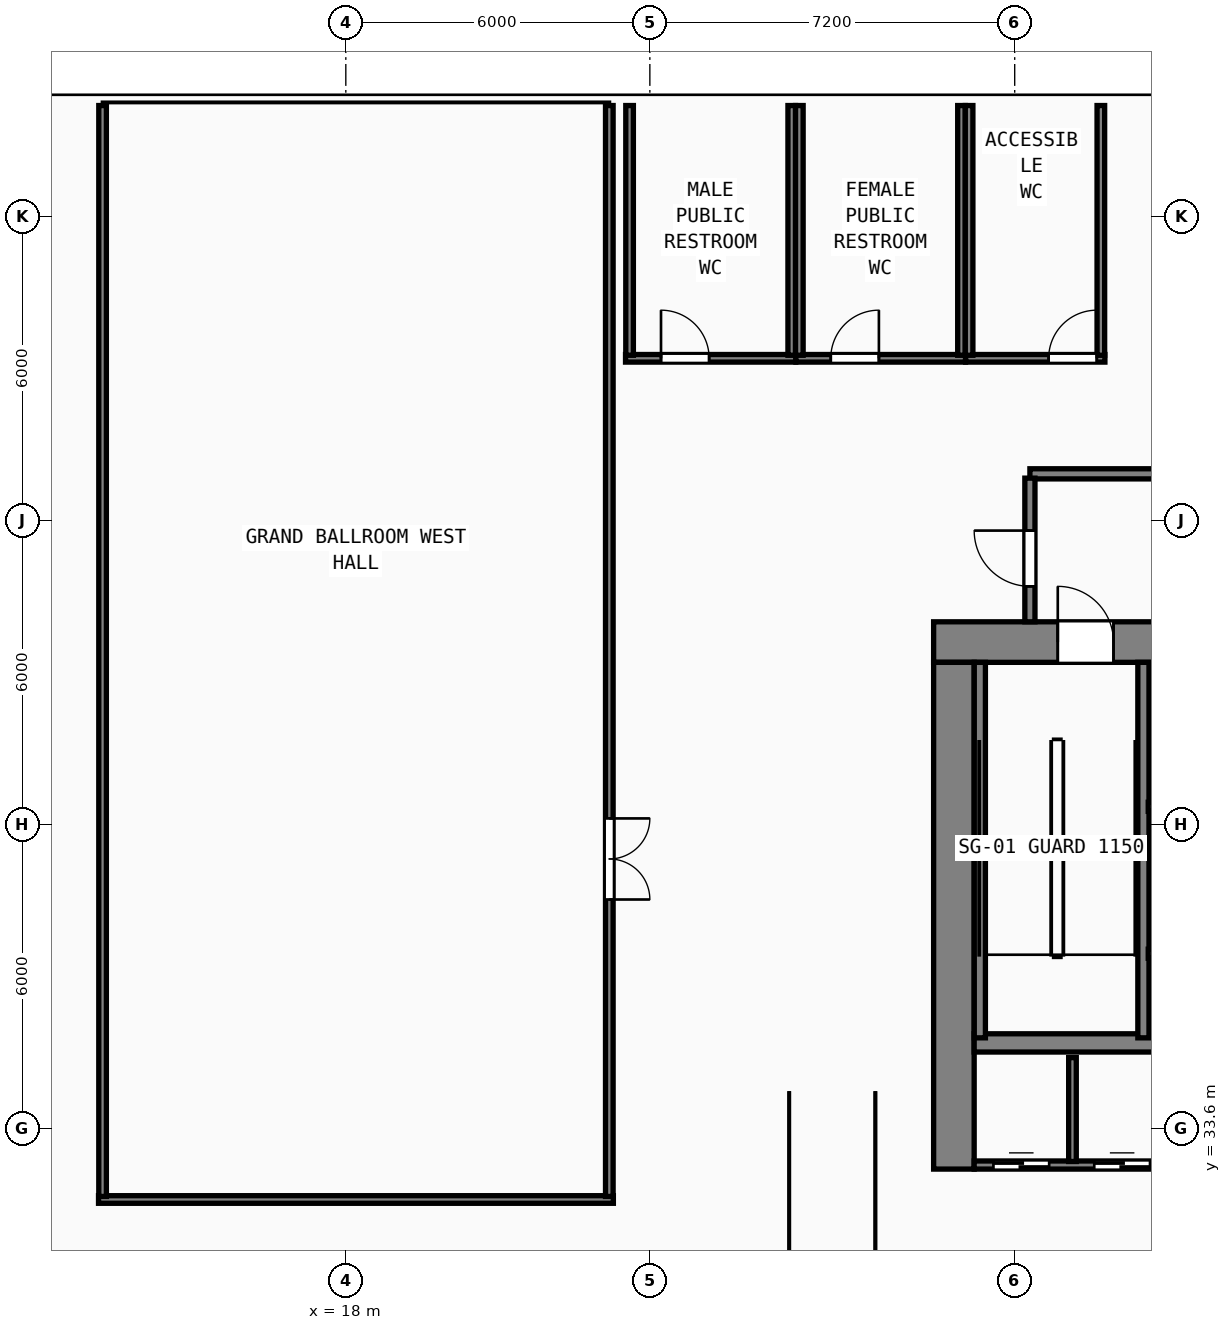
"""IFC4 building model, lengths in metres.
Left out: names, types, materials, properties, quantities, classifications, styles, units other than length and angle.
Written with IfcOpenShell. Run it as: python <this file> out.ifc"""

import sys

from ifc_helpers import new_model, si_unit, direction, frame, frame_2d, origin, origin_2d, place, context, subcontext, project, spatial, rectangle, hollow_rectangle, extrude, element, fill, save


model = new_model("IFC4")
c1 = context("Model", 3, precision=1e-05, world=origin(), true_north=direction((0.0, 1.0)))
c2 = subcontext(c1, "Body", "Model", "MODEL_VIEW")
j1 = project(units=[si_unit("LENGTHUNIT", "METRE"), si_unit("PLANEANGLEUNIT", "RADIAN")], contexts=[c1])
p1 = place(None, origin())
s1 = spatial("IfcSite", under=j1, at=p1, CompositionType="ELEMENT")
p2 = place(p1, origin())
s2 = spatial("IfcBuilding", under=s1, at=p2, CompositionType="ELEMENT")
p3 = place(p2, frame((0.0, 0.0, 10.2)))
s3 = spatial("IfcBuildingStorey", under=s2, at=p3, CompositionType="ELEMENT", Elevation=10.2)
p4 = place(p3, frame((29.6, 43.2, 0.0), z_axis=(0.0, 0.0, 1.0), x_axis=(1.0, 0.0, 0.0)))
e1 = element("IfcWall", 1, at=p4, inside=s3, PredefinedType="SHEAR", context=c2, shape_type="SweptSolid", body=[
    extrude(rectangle(XDim=17.6, YDim=0.8, at=frame_2d((8.8, 0.0))), origin(), (0.0, 0.0, 1.0), 5.16),
])
p5 = place(p4, frame((2.45, 0.0, 0.0)))
e2 = element("IfcOpeningElement", 2, at=p5, cuts=e1, PredefinedType="OPENING", context=c2, shape_type="SweptSolid", body=[
    extrude(rectangle(XDim=1.1, YDim=2.15, at=frame_2d((0.55, 1.075))), frame((0.0, 0.41, 0.0), z_axis=(0.0, -1.0, 0.0), x_axis=(1.0, 0.0, 0.0)), (0.0, 0.0, 1.0), 0.82),
])
p6 = place(p4, frame((7.56, 0.0, 0.0)))
e3 = element("IfcOpeningElement", 3, at=p6, cuts=e1, PredefinedType="OPENING", context=c2, shape_type="SweptSolid", body=[
    extrude(rectangle(XDim=1.1, YDim=2.15, at=frame_2d((0.55, 1.075))), frame((0.0, 0.41, 0.0), z_axis=(0.0, -1.0, 0.0), x_axis=(1.0, 0.0, 0.0)), (0.0, 0.0, 1.0), 0.82),
])
p7 = place(p4, frame((13.65, 0.0, 0.0)))
e4 = element("IfcOpeningElement", 4, at=p7, cuts=e1, PredefinedType="OPENING", context=c2, shape_type="SweptSolid", body=[
    extrude(rectangle(XDim=1.1, YDim=2.15, at=frame_2d((0.55, 1.075))), frame((0.0, 0.41, 0.0), z_axis=(0.0, -1.0, 0.0), x_axis=(1.0, 0.0, 0.0)), (0.0, 0.0, 1.0), 0.82),
])
p8 = place(p4, frame((4.78, 0.0, 0.0)))
e5 = element("IfcOpeningElement", 5, at=p8, cuts=e1, PredefinedType="OPENING", context=c2, shape_type="SweptSolid", body=[
    extrude(rectangle(XDim=1.1, YDim=2.2, at=frame_2d((0.55, 1.1))), frame((0.0, 0.41, 0.0), z_axis=(0.0, -1.0, 0.0), x_axis=(1.0, 0.0, 0.0)), (0.0, 0.0, 1.0), 0.82),
])
p9 = place(p4, frame((11.14, 0.0, 0.0)))
e6 = element("IfcOpeningElement", 6, at=p9, cuts=e1, PredefinedType="OPENING", context=c2, shape_type="SweptSolid", body=[
    extrude(rectangle(XDim=1.1, YDim=2.2, at=frame_2d((0.55, 1.1))), frame((0.0, 0.41, 0.0), z_axis=(0.0, -1.0, 0.0), x_axis=(1.0, 0.0, 0.0)), (0.0, 0.0, 1.0), 0.82),
])
p10 = place(p3, frame((30.0, 32.8, 0.0), z_axis=(0.0, 0.0, 1.0), x_axis=(0.0, 1.0, 0.0)))
e7 = element("IfcWall", 7, at=p10, inside=s3, PredefinedType="SHEAR", context=c2, shape_type="SweptSolid", body=[
    extrude(rectangle(XDim=10.0, YDim=0.8, at=frame_2d((5.0, 0.0))), origin(), (0.0, 0.0, 1.0), 5.16),
])
p11 = place(p3, frame((30.4, 35.29, 0.0), z_axis=(0.0, 0.0, 1.0), x_axis=(1.0, 0.0, 0.0)))
e8 = element("IfcWall", 8, at=p11, inside=s3, PredefinedType="SHEAR", context=c2, shape_type="SweptSolid", body=[
    extrude(rectangle(XDim=16.0, YDim=0.36, at=frame_2d((8.0, 0.0))), origin(), (0.0, 0.0, 1.0), 5.16),
])
p12 = place(p11, frame((4.95, 0.0, 0.0), z_axis=(0.0, 0.0, 1.0), x_axis=(-1.0, 0.0, 0.0)))
e9 = element("IfcOpeningElement", 9, at=p12, cuts=e8, PredefinedType="OPENING", context=c2, shape_type="SweptSolid", body=[
    extrude(rectangle(XDim=0.9, YDim=2.1, at=frame_2d((0.45, 1.05))), frame((0.0, 0.19, 0.0), z_axis=(0.0, -1.0, 0.0), x_axis=(1.0, 0.0, 0.0)), (0.0, 0.0, 1.0), 0.38),
])
p13 = place(p11, frame((12.01, 0.0, 0.0), z_axis=(0.0, 0.0, 1.0), x_axis=(-1.0, 0.0, 0.0)))
e10 = element("IfcOpeningElement", 10, at=p13, cuts=e8, PredefinedType="OPENING", context=c2, shape_type="SweptSolid", body=[
    extrude(rectangle(XDim=0.9, YDim=2.1, at=frame_2d((0.45, 1.05))), frame((0.0, 0.19, 0.0), z_axis=(0.0, -1.0, 0.0), x_axis=(1.0, 0.0, 0.0)), (0.0, 0.0, 1.0), 0.38),
])
for number, where, z_axis, x_axis in (
    (11, (30.512, 35.39, 0.0), (0.0, 0.0, 1.0), (0.0, 1.0, 0.0)),
    (12, (33.74, 35.39, 0.0), (0.0, 0.0, 1.0), (0.0, 1.0, 0.0)),
):
    element("IfcWall", number, at=place(p3, frame(where, z_axis=z_axis, x_axis=x_axis)), inside=s3, PredefinedType="SHEAR", context=c2, shape_type="SweptSolid", body=[
        extrude(rectangle(XDim=7.41, YDim=0.22, at=frame_2d((3.705, 0.0))), origin(), (0.0, 0.0, 1.0), 5.16),
    ])
for number, where, z_axis, x_axis in (
    (13, (24.0, 33.6, 0.0), (0.0, 0.0, 1.0), (1.0, 0.0, 0.0)),
    (14, (24.0, 45.6, 0.0), (0.0, 0.0, 1.0), (1.0, 0.0, 0.0)),
    (15, (31.2, 50.4, 0.0), (0.0, 0.0, 1.0), (1.0, 0.0, 0.0)),
    (16, (12.6, 38.4, 0.0), (0.0, 0.0, 1.0), (1.0, 0.0, 0.0)),
):
    element("IfcColumn", number, at=place(p3, frame(where, z_axis=z_axis, x_axis=x_axis)), inside=s3, PredefinedType="COLUMN", context=c2, shape_type="SweptSolid", body=[
        extrude(hollow_rectangle(XDim=1.3, YDim=1.3, WallThickness=0.048, at=origin_2d()), origin(), (0.0, 0.0, 1.0), 5.4),
    ])
p14 = place(p3, frame((18.0, 51.6, 0.0), z_axis=(0.0, 0.0, 1.0), x_axis=(1.0, 0.0, 0.0)))
e17 = element("IfcColumn", 17, at=p14, inside=s3, PredefinedType="COLUMN", context=c2, shape_type="SweptSolid", body=[
    extrude(rectangle(XDim=0.9, YDim=0.9, at=origin_2d()), origin(), (0.0, 0.0, 1.0), 5.4),
])
p15 = place(p3, frame((31.5, 46.52, 0.0), z_axis=(0.0, 0.0, 1.0), x_axis=(1.0, 0.0, 0.0)))
e18 = element("IfcWall", 18, at=p15, inside=s3, PredefinedType="SOLIDWALL", context=c2, shape_type="SweptSolid", body=[
    extrude(rectangle(XDim=13.8, YDim=0.2, at=frame_2d((6.9, 0.0))), origin(), (0.0, 0.0, 1.0), 5.16),
])
p16 = place(p3, frame((31.5, 43.6, 0.0), z_axis=(0.0, 0.0, 1.0), x_axis=(0.0, 1.0, 0.0)))
e19 = element("IfcWall", 19, at=p16, inside=s3, PredefinedType="SOLIDWALL", context=c2, shape_type="SweptSolid", body=[
    extrude(rectangle(XDim=2.835, YDim=0.2, at=frame_2d((1.417, 0.0))), origin(), (0.0, 0.0, 1.0), 5.16),
])
p17 = place(p16, frame((1.8, 0.0, 0.0), z_axis=(0.0, 0.0, 1.0), x_axis=(-1.0, 0.0, 0.0)))
e20 = element("IfcOpeningElement", 20, at=p17, cuts=e19, PredefinedType="OPENING", context=c2, shape_type="SweptSolid", body=[
    extrude(rectangle(XDim=1.1, YDim=2.15, at=frame_2d((0.55, 1.075))), frame((0.0, 0.11, 0.0), z_axis=(0.0, -1.0, 0.0), x_axis=(1.0, 0.0, 0.0)), (0.0, 0.0, 1.0), 0.22),
])
p18 = place(p3, frame((33.835, 39.95, 0.0), z_axis=(0.0, 0.0, 1.0), x_axis=(1.0, 0.0, 0.0)))
e21 = element("IfcWall", 21, at=p18, inside=s3, PredefinedType="SOLIDWALL", context=c2, shape_type="SweptSolid", body=[
    extrude(rectangle(XDim=2.77, YDim=0.18, at=frame_2d((1.385, 0.0))), origin(), (0.0, 0.0, 1.0), 5.16),
])
p19 = place(p3, frame((33.835, 37.05, 0.0), z_axis=(0.0, 0.0, 1.0), x_axis=(1.0, 0.0, 0.0)))
e22 = element("IfcWall", 22, at=p19, inside=s3, PredefinedType="SOLIDWALL", context=c2, shape_type="SweptSolid", body=[
    extrude(rectangle(XDim=2.77, YDim=0.18, at=frame_2d((1.385, 0.0))), origin(), (0.0, 0.0, 1.0), 5.16),
])
p20 = place(p19, frame((1.945, 0.0, 0.0), z_axis=(0.0, 0.0, 1.0), x_axis=(-1.0, 0.0, 0.0)))
e23 = element("IfcOpeningElement", 23, at=p20, cuts=e22, PredefinedType="OPENING", context=c2, shape_type="SweptSolid", body=[
    extrude(rectangle(XDim=1.2, YDim=2.2, at=frame_2d((0.6, 1.1))), frame((0.0, 0.1, 0.0), z_axis=(0.0, -1.0, 0.0), x_axis=(1.0, 0.0, 0.0)), (0.0, 0.0, 1.0), 0.2),
])
p21 = place(p3, frame((30.4, 32.88, 0.0), z_axis=(0.0, 0.0, 1.0), x_axis=(1.0, 0.0, 0.0)))
e24 = element("IfcWall", 24, at=p21, inside=s3, PredefinedType="SOLIDWALL", context=c2, shape_type="SweptSolid", body=[
    extrude(rectangle(XDim=3.85, YDim=0.16, at=frame_2d((1.925, 0.0))), origin(), (0.0, 0.0, 1.0), 5.16),
])
p22 = place(p21, frame((1.48, 0.0, 0.0), z_axis=(0.0, 0.0, 1.0), x_axis=(-1.0, 0.0, 0.0)))
e25 = element("IfcOpeningElement", 25, at=p22, cuts=e24, PredefinedType="OPENING", context=c2, shape_type="SweptSolid", body=[
    extrude(rectangle(XDim=1.1, YDim=2.2, at=frame_2d((0.55, 1.1))), frame((0.0, 0.09, 0.0), z_axis=(0.0, -1.0, 0.0), x_axis=(1.0, 0.0, 0.0)), (0.0, 0.0, 1.0), 0.18),
])
p23 = place(p21, frame((3.47, 0.0, 0.0), z_axis=(0.0, 0.0, 1.0), x_axis=(-1.0, 0.0, 0.0)))
e26 = element("IfcOpeningElement", 26, at=p23, cuts=e24, PredefinedType="OPENING", context=c2, shape_type="SweptSolid", body=[
    extrude(rectangle(XDim=1.1, YDim=2.2, at=frame_2d((0.55, 1.1))), frame((0.0, 0.09, 0.0), z_axis=(0.0, -1.0, 0.0), x_axis=(1.0, 0.0, 0.0)), (0.0, 0.0, 1.0), 0.18),
])
p24 = place(p3, frame((32.34, 32.95, 0.0), z_axis=(0.0, 0.0, 1.0), x_axis=(0.0, 1.0, 0.0)))
e27 = element("IfcWall", 27, at=p24, inside=s3, PredefinedType="SOLIDWALL", context=c2, shape_type="SweptSolid", body=[
    extrude(rectangle(XDim=2.05, YDim=0.15, at=frame_2d((1.025, 0.0))), origin(), (0.0, 0.0, 1.0), 5.16),
])
p25 = place(p3, frame((23.52, 48.8, 0.0), z_axis=(0.0, 0.0, 1.0), x_axis=(1.0, 0.0, 0.0)))
e28 = element("IfcWall", 28, at=p25, inside=s3, PredefinedType="PARTITIONING", context=c2, shape_type="SweptSolid", body=[
    extrude(rectangle(XDim=3.36, YDim=0.15, at=frame_2d((1.68, 0.0))), origin(), (0.0, 0.0, 1.0), 5.16),
])
p26 = place(p25, frame((0.7, 0.0, 0.0)))
e29 = element("IfcOpeningElement", 29, at=p26, cuts=e28, PredefinedType="OPENING", context=c2, shape_type="SweptSolid", body=[
    extrude(rectangle(XDim=0.95, YDim=2.12, at=frame_2d((0.475, 1.06))), frame((0.0, 0.085, 0.0), z_axis=(0.0, -1.0, 0.0), x_axis=(1.0, 0.0, 0.0)), (0.0, 0.0, 1.0), 0.17),
])
for number, where, z_axis, x_axis in (
    (30, (23.6, 48.86, 0.0), (0.0, 0.0, 1.0), (0.0, 1.0, 0.0)),
    (31, (26.8, 48.86, 0.0), (0.0, 0.0, 1.0), (0.0, 1.0, 0.0)),
):
    element("IfcWall", number, at=place(p3, frame(where, z_axis=z_axis, x_axis=x_axis)), inside=s3, PredefinedType="PARTITIONING", context=c2, shape_type="SweptSolid", body=[
        extrude(rectangle(XDim=4.928, YDim=0.15, at=frame_2d((2.464, 0.0))), origin(), (0.0, 0.0, 1.0), 5.16),
    ])
p27 = place(p3, frame((26.882, 48.8, 0.0), z_axis=(0.0, 0.0, 1.0), x_axis=(1.0, 0.0, 0.0)))
e32 = element("IfcWall", 32, at=p27, inside=s3, PredefinedType="PARTITIONING", context=c2, shape_type="SweptSolid", body=[
    extrude(rectangle(XDim=3.348, YDim=0.15, at=frame_2d((1.674, 0.0))), origin(), (0.0, 0.0, 1.0), 5.16),
])
p28 = place(p27, frame((0.688, 0.0, 0.0)))
e33 = element("IfcOpeningElement", 33, at=p28, cuts=e32, PredefinedType="OPENING", context=c2, shape_type="SweptSolid", body=[
    extrude(rectangle(XDim=0.95, YDim=2.12, at=frame_2d((0.475, 1.06))), frame((0.0, 0.085, 0.0), z_axis=(0.0, -1.0, 0.0), x_axis=(1.0, 0.0, 0.0)), (0.0, 0.0, 1.0), 0.17),
])
for number, where, z_axis, x_axis in (
    (34, (26.95, 48.86, 0.0), (0.0, 0.0, 1.0), (0.0, 1.0, 0.0)),
    (35, (30.15, 48.86, 0.0), (0.0, 0.0, 1.0), (0.0, 1.0, 0.0)),
):
    element("IfcWall", number, at=place(p3, frame(where, z_axis=z_axis, x_axis=x_axis)), inside=s3, PredefinedType="PARTITIONING", context=c2, shape_type="SweptSolid", body=[
        extrude(rectangle(XDim=4.928, YDim=0.15, at=frame_2d((2.464, 0.0))), origin(), (0.0, 0.0, 1.0), 5.16),
    ])
p29 = place(p3, frame((30.232, 48.8, 0.0), z_axis=(0.0, 0.0, 1.0), x_axis=(1.0, 0.0, 0.0)))
e36 = element("IfcWall", 36, at=p29, inside=s3, PredefinedType="PARTITIONING", context=c2, shape_type="SweptSolid", body=[
    extrude(rectangle(XDim=2.748, YDim=0.15, at=frame_2d((1.374, 0.0))), origin(), (0.0, 0.0, 1.0), 5.16),
])
p30 = place(p29, frame((1.638, 0.0, 0.0)))
e37 = element("IfcOpeningElement", 37, at=p30, cuts=e36, PredefinedType="OPENING", context=c2, shape_type="SweptSolid", body=[
    extrude(rectangle(XDim=0.95, YDim=2.12, at=frame_2d((0.475, 1.06))), frame((0.0, 0.085, 0.0), z_axis=(0.0, -1.0, 0.0), x_axis=(1.0, 0.0, 0.0)), (0.0, 0.0, 1.0), 0.17),
])
for number, where, z_axis, x_axis in (
    (38, (30.3, 48.86, 0.0), (0.0, 0.0, 1.0), (0.0, 1.0, 0.0)),
    (39, (32.9, 48.86, 0.0), (0.0, 0.0, 1.0), (0.0, 1.0, 0.0)),
):
    element("IfcWall", number, at=place(p3, frame(where, z_axis=z_axis, x_axis=x_axis)), inside=s3, PredefinedType="PARTITIONING", context=c2, shape_type="SweptSolid", body=[
        extrude(rectangle(XDim=4.928, YDim=0.15, at=frame_2d((2.464, 0.0))), origin(), (0.0, 0.0, 1.0), 5.16),
    ])
p31 = place(p3, frame((13.12, 32.2, 0.0), z_axis=(0.0, 0.0, 1.0), x_axis=(1.0, 0.0, 0.0)))
e40 = element("IfcWall", 40, at=p31, inside=s3, PredefinedType="PARTITIONING", context=c2, shape_type="SweptSolid", body=[
    extrude(rectangle(XDim=10.16, YDim=0.15, at=frame_2d((5.08, 0.0))), origin(), (0.0, 0.0, 1.0), 5.16),
])
p32 = place(p3, frame((13.2, 32.26, 0.0), z_axis=(0.0, 0.0, 1.0), x_axis=(0.0, 1.0, 0.0)))
e41 = element("IfcWall", 41, at=p32, inside=s3, PredefinedType="PARTITIONING", context=c2, shape_type="SweptSolid", body=[
    extrude(rectangle(XDim=21.528, YDim=0.15, at=frame_2d((10.764, 0.0))), origin(), (0.0, 0.0, 1.0), 5.16),
])
p33 = place(p3, frame((23.2, 32.26, 0.0), z_axis=(0.0, 0.0, 1.0), x_axis=(0.0, 1.0, 0.0)))
e42 = element("IfcWall", 42, at=p33, inside=s3, PredefinedType="PARTITIONING", context=c2, shape_type="SweptSolid", body=[
    extrude(rectangle(XDim=21.528, YDim=0.15, at=frame_2d((10.764, 0.0))), origin(), (0.0, 0.0, 1.0), 5.16),
])
p34 = place(p33, frame((7.46, 0.0, 0.0), z_axis=(0.0, 0.0, 1.0), x_axis=(-1.0, 0.0, 0.0)))
e43 = element("IfcOpeningElement", 43, at=p34, cuts=e42, PredefinedType="OPENING", context=c2, shape_type="SweptSolid", body=[
    extrude(rectangle(XDim=1.6, YDim=2.25, at=frame_2d((0.8, 1.125))), frame((0.0, 0.085, 0.0), z_axis=(0.0, -1.0, 0.0), x_axis=(1.0, 0.0, 0.0)), (0.0, 0.0, 1.0), 0.17),
])
p35 = place(p5, origin())
e44 = element("IfcDoor", 44, at=p35, inside=s3, OperationType="SINGLE_SWING_LEFT", PredefinedType="DOOR", context=c2, shape_type="SweptSolid", body=[
    extrude(rectangle(XDim=1.1, YDim=2.15, at=frame_2d((0.55, 1.075))), frame((0.0, 0.185, 0.0), z_axis=(0.0, -1.0, 0.0), x_axis=(1.0, 0.0, 0.0)), (0.0, 0.0, 1.0), 0.05),
])
fill(e2, e44)
p36 = place(p17, origin())
e45 = element("IfcDoor", 45, at=p36, inside=s3, OperationType="SINGLE_SWING_LEFT", PredefinedType="DOOR", context=c2, shape_type="SweptSolid", body=[
    extrude(rectangle(XDim=1.1, YDim=2.15, at=frame_2d((0.55, 1.075))), frame((0.0, 0.025, 0.0), z_axis=(0.0, -1.0, 0.0), x_axis=(1.0, 0.0, 0.0)), (0.0, 0.0, 1.0), 0.05),
])
fill(e20, e45)
p37 = place(p22, origin())
e46 = element("IfcDoor", 46, at=p37, inside=s3, OperationType="SLIDING_TO_LEFT", PredefinedType="DOOR", context=c2, shape_type="SweptSolid", body=[
    extrude(rectangle(XDim=1.1, YDim=2.2, at=frame_2d((0.55, 1.1))), frame((0.0, 0.025, 0.0), z_axis=(0.0, -1.0, 0.0), x_axis=(1.0, 0.0, 0.0)), (0.0, 0.0, 1.0), 0.05),
])
fill(e25, e46)
p38 = place(p23, origin())
e47 = element("IfcDoor", 47, at=p38, inside=s3, OperationType="SLIDING_TO_LEFT", PredefinedType="DOOR", context=c2, shape_type="SweptSolid", body=[
    extrude(rectangle(XDim=1.1, YDim=2.2, at=frame_2d((0.55, 1.1))), frame((0.0, 0.025, 0.0), z_axis=(0.0, -1.0, 0.0), x_axis=(1.0, 0.0, 0.0)), (0.0, 0.0, 1.0), 0.05),
])
fill(e26, e47)
p39 = place(p26, origin())
e48 = element("IfcDoor", 48, at=p39, inside=s3, OperationType="SINGLE_SWING_LEFT", PredefinedType="DOOR", context=c2, shape_type="SweptSolid", body=[
    extrude(rectangle(XDim=0.95, YDim=2.12, at=frame_2d((0.475, 1.06))), frame((0.0, 0.025, 0.0), z_axis=(0.0, -1.0, 0.0), x_axis=(1.0, 0.0, 0.0)), (0.0, 0.0, 1.0), 0.05),
])
fill(e29, e48)
p40 = place(p28, origin())
e49 = element("IfcDoor", 49, at=p40, inside=s3, OperationType="SINGLE_SWING_RIGHT", PredefinedType="DOOR", context=c2, shape_type="SweptSolid", body=[
    extrude(rectangle(XDim=0.95, YDim=2.12, at=frame_2d((0.475, 1.06))), frame((0.0, 0.025, 0.0), z_axis=(0.0, -1.0, 0.0), x_axis=(1.0, 0.0, 0.0)), (0.0, 0.0, 1.0), 0.05),
])
fill(e33, e49)
p41 = place(p30, origin())
e50 = element("IfcDoor", 50, at=p41, inside=s3, OperationType="SINGLE_SWING_RIGHT", PredefinedType="DOOR", context=c2, shape_type="SweptSolid", body=[
    extrude(rectangle(XDim=0.95, YDim=2.12, at=frame_2d((0.475, 1.06))), frame((0.0, 0.025, 0.0), z_axis=(0.0, -1.0, 0.0), x_axis=(1.0, 0.0, 0.0)), (0.0, 0.0, 1.0), 0.05),
])
fill(e37, e50)
p42 = place(p34, origin())
e51 = element("IfcDoor", 51, at=p42, inside=s3, OperationType="DOUBLE_DOOR_SINGLE_SWING", PredefinedType="DOOR", context=c2, shape_type="SweptSolid", body=[
    extrude(rectangle(XDim=1.6, YDim=2.25, at=frame_2d((0.8, 1.125))), frame((0.0, 0.025, 0.0), z_axis=(0.0, -1.0, 0.0), x_axis=(1.0, 0.0, 0.0)), (0.0, 0.0, 1.0), 0.05),
])
fill(e43, e51)
save(model, sys.argv[1])
